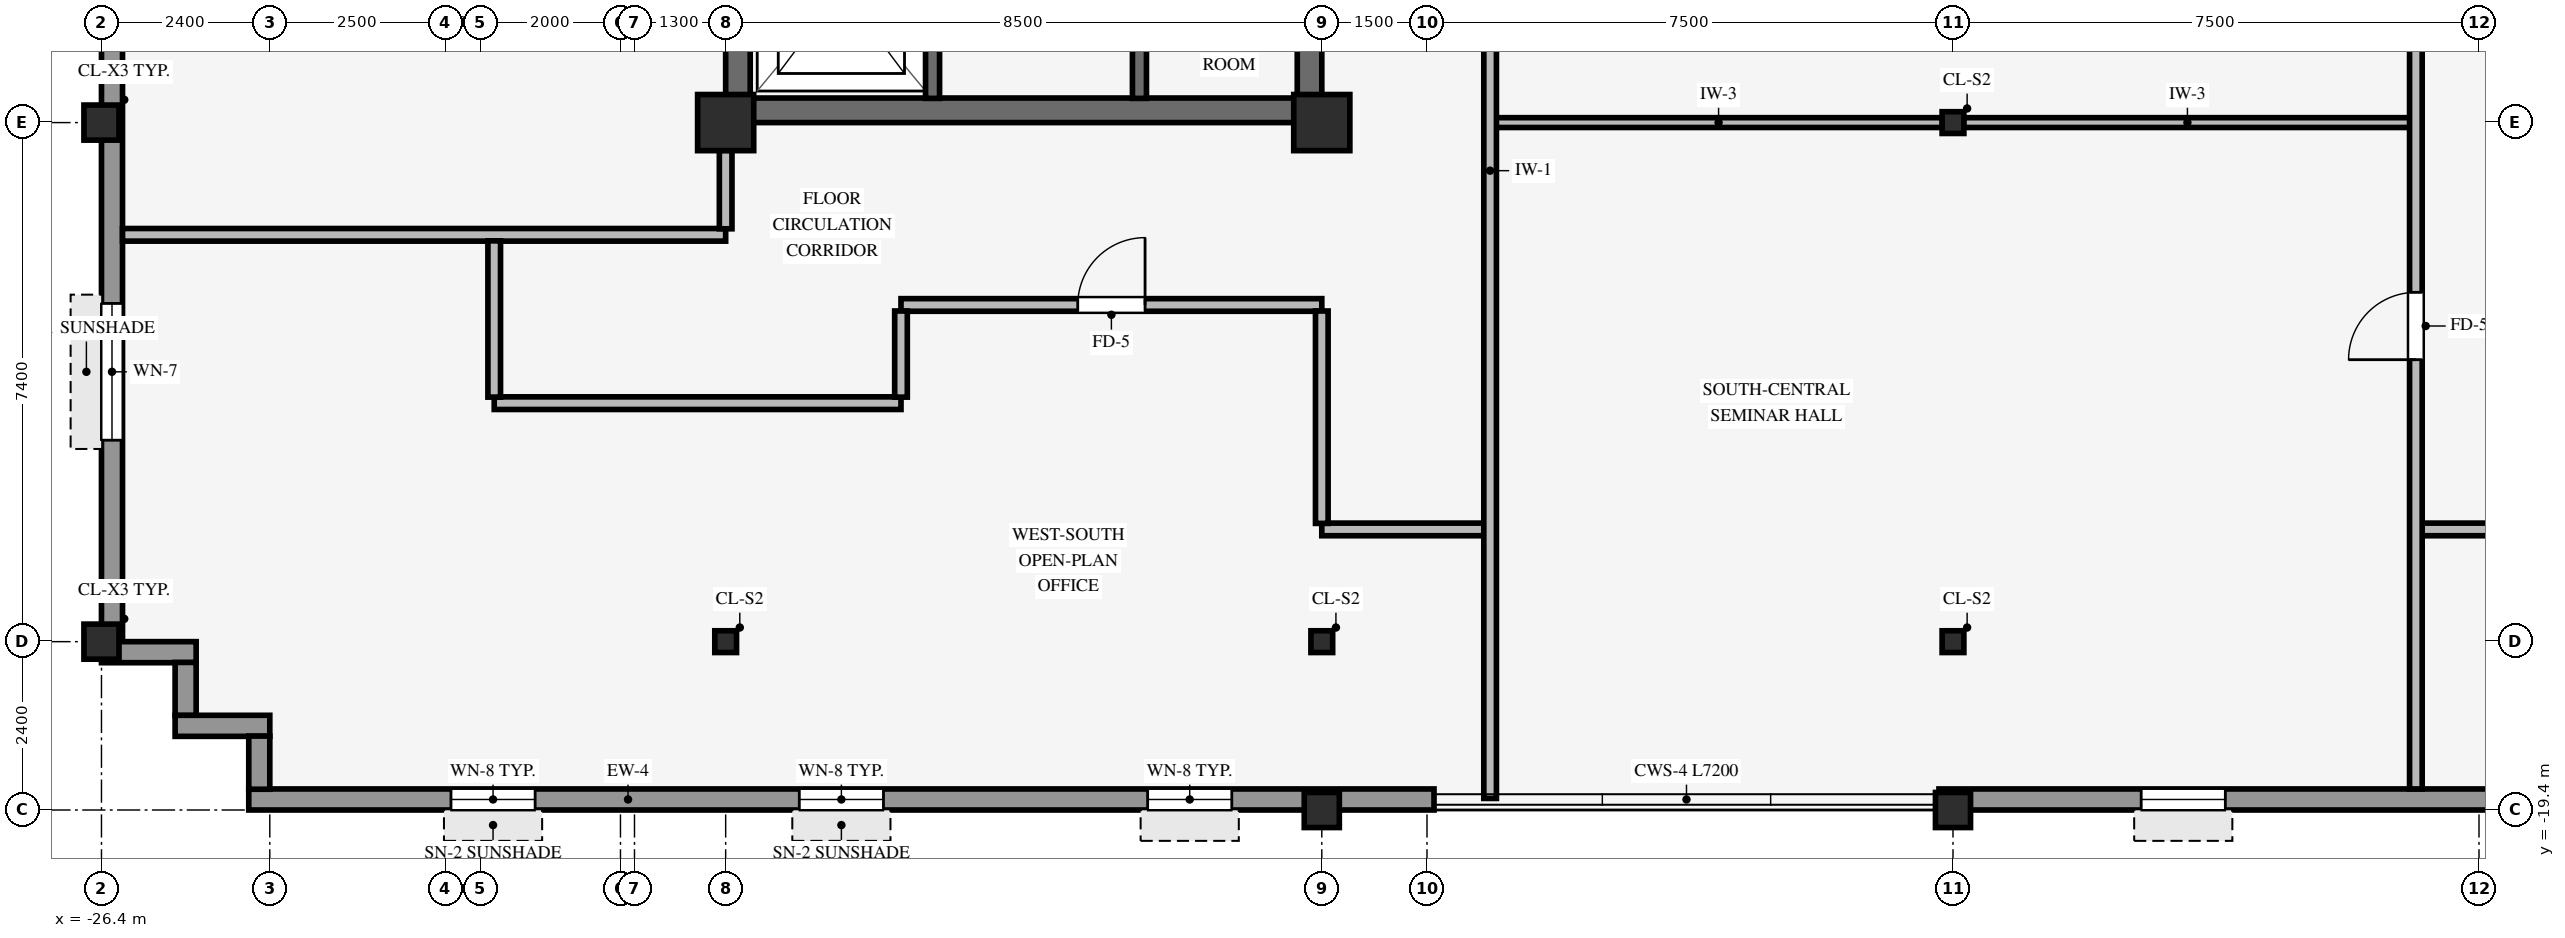
"""IFC4 building model, lengths in metres.
Left out: names, types, materials, properties, quantities, classifications, styles, units other than length and angle.
Written with IfcOpenShell. Run it as: python <this file> out.ifc"""

import sys

from ifc_helpers import new_model, si_unit, direction, frame, frame_2d, origin, origin_2d, place, context, subcontext, project, spatial, rectangle, hollow_rectangle, i_section, extrude, source, transform, mapped, element, fill, save


model = new_model("IFC4")
c1 = context("Model", 3, precision=1e-05, world=origin(), true_north=direction((0.0, 1.0)))
c2 = subcontext(c1, "Body", "Model", "MODEL_VIEW")
j1 = project(units=[si_unit("LENGTHUNIT", "METRE"), si_unit("PLANEANGLEUNIT", "RADIAN")], contexts=[c1])
p1 = place(None, origin())
s1 = spatial("IfcSite", under=j1, at=p1, CompositionType="ELEMENT")
p2 = place(p1, origin())
s2 = spatial("IfcBuilding", under=s1, at=p2, CompositionType="ELEMENT")
p3 = place(p2, frame((0.0, 0.0, 227.4)))
s3 = spatial("IfcBuildingStorey", under=s2, at=p3, CompositionType="ELEMENT", Elevation=227.4)
p4 = place(p3, frame((-17.5, -9.425, 0.0), z_axis=(0.0, 0.0, 1.0), x_axis=(1.0, 0.0, 0.0)))
e1 = element("IfcWall", 1, at=p4, inside=s3, PredefinedType="SHEAR", context=c2, shape_type="SweptSolid", body=[
    extrude(rectangle(XDim=8.5, YDim=0.35, at=frame_2d((4.25, 0.0))), origin(), (0.0, 0.0, 1.0), 3.37),
])
p5 = place(p3, frame((-17.325, -9.255, 0.0), z_axis=(0.0, 0.0, 1.0), x_axis=(0.0, 1.0, 0.0)))
e2 = element("IfcWall", 2, at=p5, inside=s3, PredefinedType="SHEAR", context=c2, shape_type="SweptSolid", body=[
    extrude(rectangle(XDim=18.51, YDim=0.35, at=frame_2d((9.255, 0.0))), origin(), (0.0, 0.0, 1.0), 3.37),
])
p6 = place(p3, frame((-9.175, -9.255, 0.0), z_axis=(0.0, 0.0, 1.0), x_axis=(0.0, 1.0, 0.0)))
e3 = element("IfcWall", 3, at=p6, inside=s3, PredefinedType="SHEAR", context=c2, shape_type="SweptSolid", body=[
    extrude(rectangle(XDim=18.51, YDim=0.35, at=frame_2d((9.255, 0.0))), origin(), (0.0, 0.0, 1.0), 3.37),
])
p7 = place(p6, frame((8.655, 0.0, 0.0)))
e4 = element("IfcOpeningElement", 4, at=p7, cuts=e3, PredefinedType="OPENING", context=c2, shape_type="SweptSolid", body=[
    extrude(rectangle(XDim=1.2, YDim=2.15, at=frame_2d((0.6, 1.075))), frame((0.0, 0.185, 0.0), z_axis=(0.0, -1.0, 0.0), x_axis=(1.0, 0.0, 0.0)), (0.0, 0.0, 1.0), 0.37),
])
for number, where, z_axis, x_axis in (
    (5, (-17.5, -9.6, 0.0), (0.0, 0.0, 1.0), (1.0, 0.0, 0.0)),
    (6, (-9.0, -9.6, 0.0), (0.0, 0.0, 1.0), (1.0, 0.0, 0.0)),
):
    element("IfcColumn", number, at=place(p3, frame(where, z_axis=z_axis, x_axis=x_axis)), inside=s3, PredefinedType="COLUMN", context=c2, shape_type="SweptSolid", body=[
        extrude(rectangle(XDim=0.8, YDim=0.8, at=origin_2d()), origin(), (0.0, 0.0, 1.0), 3.37),
    ])
for number, where, z_axis, x_axis in (
    (7, (-26.4, -17.0, 0.0), (0.0, 0.0, 1.0), (1.0, 0.0, 0.0)),
    (8, (-26.4, -9.6, 0.0), (0.0, 0.0, 1.0), (1.0, 0.0, 0.0)),
    (9, (-9.0, -19.4, 0.0), (0.0, 0.0, 1.0), (1.0, 0.0, 0.0)),
    (10, (0.0, -19.4, 0.0), (0.0, 0.0, 1.0), (1.0, 0.0, 0.0)),
):
    element("IfcColumn", number, at=place(p3, frame(where, z_axis=z_axis, x_axis=x_axis)), inside=s3, PredefinedType="COLUMN", context=c2, shape_type="SweptSolid", body=[
        extrude(hollow_rectangle(XDim=0.5, YDim=0.5, WallThickness=0.032, InnerFilletRadius=0.032, OuterFilletRadius=0.064, at=origin_2d()), origin(), (0.0, 0.0, 1.0), 3.37),
    ])
for number, where, z_axis, x_axis in (
    (11, (0.0, -17.0, 0.0), (0.0, 0.0, 1.0), (1.0, 0.0, 0.0)),
    (12, (0.0, -9.6, 0.0), (0.0, 0.0, 1.0), (1.0, 0.0, 0.0)),
    (13, (-17.5, -17.0, 0.0), (0.0, 0.0, 1.0), (1.0, 0.0, 0.0)),
    (14, (-9.0, -17.0, 0.0), (0.0, 0.0, 1.0), (1.0, 0.0, 0.0)),
):
    element("IfcColumn", number, at=place(p3, frame(where, z_axis=z_axis, x_axis=x_axis)), inside=s3, PredefinedType="COLUMN", context=c2, shape_type="SweptSolid", body=[
        extrude(i_section(OverallWidth=0.31, OverallDepth=0.31, WebThickness=0.015, FlangeThickness=0.015, FilletRadius=0.015, at=origin_2d()), origin(), (0.0, 0.0, 1.0), 3.37),
    ])
p8 = place(p3, frame((-24.3, -19.25, 0.0), z_axis=(0.0, 0.0, 1.0), x_axis=(1.0, 0.0, 0.0)))
e15 = element("IfcWall", 15, at=p8, inside=s3, PredefinedType="STANDARD", context=c2, shape_type="SweptSolid", body=[
    extrude(rectangle(XDim=16.9, YDim=0.3, at=frame_2d((8.45, 0.0))), origin(), (0.0, 0.0, 1.0), 2.705),
])
p9 = place(p8, frame((2.883, 0.0, 0.8)))
e16 = element("IfcOpeningElement", 16, at=p9, cuts=e15, PredefinedType="OPENING", context=c2, shape_type="SweptSolid", body=[
    extrude(rectangle(XDim=1.2, YDim=1.48, at=frame_2d((0.6, 0.74))), frame((0.0, 0.16, 0.0), z_axis=(0.0, -1.0, 0.0), x_axis=(1.0, 0.0, 0.0)), (0.0, 0.0, 1.0), 0.32),
])
p10 = place(p8, frame((7.85, 0.0, 0.8)))
e17 = element("IfcOpeningElement", 17, at=p10, cuts=e15, PredefinedType="OPENING", context=c2, shape_type="SweptSolid", body=[
    extrude(rectangle(XDim=1.2, YDim=1.48, at=frame_2d((0.6, 0.74))), frame((0.0, 0.16, 0.0), z_axis=(0.0, -1.0, 0.0), x_axis=(1.0, 0.0, 0.0)), (0.0, 0.0, 1.0), 0.32),
])
p11 = place(p8, frame((12.817, 0.0, 0.8)))
e18 = element("IfcOpeningElement", 18, at=p11, cuts=e15, PredefinedType="OPENING", context=c2, shape_type="SweptSolid", body=[
    extrude(rectangle(XDim=1.2, YDim=1.48, at=frame_2d((0.6, 0.74))), frame((0.0, 0.16, 0.0), z_axis=(0.0, -1.0, 0.0), x_axis=(1.0, 0.0, 0.0)), (0.0, 0.0, 1.0), 0.32),
])
p12 = place(p3, frame((-0.2, -19.25, 0.0), z_axis=(0.0, 0.0, 1.0), x_axis=(1.0, 0.0, 0.0)))
e19 = element("IfcWall", 19, at=p12, inside=s3, PredefinedType="STANDARD", context=c2, shape_type="SweptSolid", body=[
    extrude(rectangle(XDim=16.9, YDim=0.3, at=frame_2d((8.45, 0.0))), origin(), (0.0, 0.0, 1.0), 2.705),
])
p13 = place(p12, frame((2.883, 0.0, 0.8)))
e20 = element("IfcOpeningElement", 20, at=p13, cuts=e19, PredefinedType="OPENING", context=c2, shape_type="SweptSolid", body=[
    extrude(rectangle(XDim=1.2, YDim=1.48, at=frame_2d((0.6, 0.74))), frame((0.0, 0.16, 0.0), z_axis=(0.0, -1.0, 0.0), x_axis=(1.0, 0.0, 0.0)), (0.0, 0.0, 1.0), 0.32),
])
p14 = place(p12, frame((12.817, 0.0, 0.8)))
e21 = element("IfcOpeningElement", 21, at=p14, cuts=e19, PredefinedType="OPENING", context=c2, shape_type="SweptSolid", body=[
    extrude(rectangle(XDim=1.2, YDim=1.48, at=frame_2d((0.6, 0.74))), frame((0.0, 0.16, 0.0), z_axis=(0.0, -1.0, 0.0), x_axis=(1.0, 0.0, 0.0)), (0.0, 0.0, 1.0), 0.32),
])
p15 = place(p3, frame((-26.25, -17.004, 0.0), z_axis=(0.0, 0.0, 1.0), x_axis=(0.0, 1.0, 0.0)))
e22 = element("IfcWall", 22, at=p15, inside=s3, PredefinedType="STANDARD", context=c2, shape_type="SweptSolid", body=[
    extrude(rectangle(XDim=13.404, YDim=0.3, at=frame_2d((6.702, 0.0))), origin(), (0.0, 0.0, 1.0), 2.705),
])
p16 = place(p15, frame((2.876, 0.0, 0.8)))
e23 = element("IfcOpeningElement", 23, at=p16, cuts=e22, PredefinedType="OPENING", context=c2, shape_type="SweptSolid", body=[
    extrude(rectangle(XDim=1.95, YDim=1.48, at=frame_2d((0.975, 0.74))), frame((0.0, 0.16, 0.0), z_axis=(0.0, -1.0, 0.0), x_axis=(1.0, 0.0, 0.0)), (0.0, 0.0, 1.0), 0.32),
])
p17 = place(p15, frame((8.578, 0.0, 0.8)))
e24 = element("IfcOpeningElement", 24, at=p17, cuts=e22, PredefinedType="OPENING", context=c2, shape_type="SweptSolid", body=[
    extrude(rectangle(XDim=1.95, YDim=1.48, at=frame_2d((0.975, 0.74))), frame((0.0, 0.16, 0.0), z_axis=(0.0, -1.0, 0.0), x_axis=(1.0, 0.0, 0.0)), (0.0, 0.0, 1.0), 0.32),
])
p18 = place(p3, frame((-26.4, -17.15, 0.0), z_axis=(0.0, 0.0, 1.0), x_axis=(1.0, 0.0, 0.0)))
e25 = element("IfcWall", 25, at=p18, inside=s3, PredefinedType="STANDARD", context=c2, shape_type="SweptSolid", body=[
    extrude(rectangle(XDim=1.35, YDim=0.3, at=frame_2d((0.675, 0.0))), origin(), (0.0, 0.0, 1.0), 2.892),
])
p19 = place(p3, frame((-25.2, -18.054, 0.0), z_axis=(0.0, 0.0, 1.0), x_axis=(0.0, 1.0, 0.0)))
e26 = element("IfcWall", 26, at=p19, inside=s3, PredefinedType="STANDARD", context=c2, shape_type="SweptSolid", body=[
    extrude(rectangle(XDim=0.758, YDim=0.3, at=frame_2d((0.379, 0.0))), origin(), (0.0, 0.0, 1.0), 2.892),
])
p20 = place(p3, frame((-25.35, -18.2, 0.0), z_axis=(0.0, 0.0, 1.0), x_axis=(1.0, 0.0, 0.0)))
e27 = element("IfcWall", 27, at=p20, inside=s3, PredefinedType="STANDARD", context=c2, shape_type="SweptSolid", body=[
    extrude(rectangle(XDim=1.35, YDim=0.3, at=frame_2d((0.675, 0.0))), origin(), (0.0, 0.0, 1.0), 2.892),
])
p21 = place(p3, frame((-24.15, -19.104, 0.0), z_axis=(0.0, 0.0, 1.0), x_axis=(0.0, 1.0, 0.0)))
e28 = element("IfcWall", 28, at=p21, inside=s3, PredefinedType="STANDARD", context=c2, shape_type="SweptSolid", body=[
    extrude(rectangle(XDim=0.758, YDim=0.3, at=frame_2d((0.379, 0.0))), origin(), (0.0, 0.0, 1.0), 2.892),
])
p22 = place(p3, frame((-14.55, -9.255, 0.0), z_axis=(0.0, 0.0, 1.0), x_axis=(0.0, 1.0, 0.0)))
e29 = element("IfcWall", 29, at=p22, inside=s3, PredefinedType="SHEAR", context=c2, shape_type="SweptSolid", body=[
    extrude(rectangle(XDim=3.06, YDim=0.2, at=frame_2d((1.53, 0.0))), origin(), (0.0, 0.0, 1.0), 3.37),
])
p23 = place(p22, frame((0.98, 0.0, 0.0)))
e30 = element("IfcOpeningElement", 30, at=p23, cuts=e29, PredefinedType="OPENING", context=c2, shape_type="SweptSolid", body=[
    extrude(rectangle(XDim=1.15, YDim=2.15, at=frame_2d((0.575, 1.075))), frame((0.0, 0.11, 0.0), z_axis=(0.0, -1.0, 0.0), x_axis=(1.0, 0.0, 0.0)), (0.0, 0.0, 1.0), 0.22),
])
p24 = place(p3, frame((-11.6, -9.255, 0.0), z_axis=(0.0, 0.0, 1.0), x_axis=(0.0, 1.0, 0.0)))
e31 = element("IfcWall", 31, at=p24, inside=s3, PredefinedType="SHEAR", context=c2, shape_type="SweptSolid", body=[
    extrude(rectangle(XDim=8.025, YDim=0.2, at=frame_2d((4.012, 0.0))), origin(), (0.0, 0.0, 1.0), 3.37),
])
p25 = place(p24, frame((1.615, 0.0, 0.0)))
e32 = element("IfcOpeningElement", 32, at=p25, cuts=e31, PredefinedType="OPENING", context=c2, shape_type="SweptSolid", body=[
    extrude(rectangle(XDim=0.88, YDim=2.1, at=frame_2d((0.44, 1.05))), frame((0.0, 0.11, 0.0), z_axis=(0.0, -1.0, 0.0), x_axis=(1.0, 0.0, 0.0)), (0.0, 0.0, 1.0), 0.22),
])
p26 = place(p24, frame((5.615, 0.0, 0.0)))
e33 = element("IfcOpeningElement", 33, at=p26, cuts=e31, PredefinedType="OPENING", context=c2, shape_type="SweptSolid", body=[
    extrude(rectangle(XDim=0.88, YDim=2.1, at=frame_2d((0.44, 1.05))), frame((0.0, 0.11, 0.0), z_axis=(0.0, -1.0, 0.0), x_axis=(1.0, 0.0, 0.0)), (0.0, 0.0, 1.0), 0.22),
])
for number, where, z_axis, x_axis in (
    (34, (-9.0, -15.4, 0.0), (0.0, 0.0, 1.0), (1.0, 0.0, 0.0)),
    (35, (6.666, -15.4, 0.0), (0.0, 0.0, 1.0), (1.0, 0.0, 0.0)),
):
    element("IfcWall", number, at=place(p3, frame(where, z_axis=z_axis, x_axis=x_axis)), inside=s3, PredefinedType="PARTITIONING", context=c2, shape_type="SweptSolid", body=[
        extrude(rectangle(XDim=2.334, YDim=0.18, at=frame_2d((1.167, 0.0))), origin(), (0.0, 0.0, 1.0), 3.36),
    ])
p27 = place(p3, frame((-20.8, -13.6, 0.0), z_axis=(0.0, 0.0, 1.0), x_axis=(1.0, 0.0, 0.0)))
e36 = element("IfcWall", 36, at=p27, inside=s3, PredefinedType="PARTITIONING", context=c2, shape_type="SweptSolid", body=[
    extrude(rectangle(XDim=5.8, YDim=0.18, at=frame_2d((2.9, 0.0))), origin(), (0.0, 0.0, 1.0), 3.049),
])
p28 = place(p3, frame((-15.0, -12.2, 0.0), z_axis=(0.0, 0.0, 1.0), x_axis=(1.0, 0.0, 0.0)))
e37 = element("IfcWall", 37, at=p28, inside=s3, PredefinedType="PARTITIONING", context=c2, shape_type="SweptSolid", body=[
    extrude(rectangle(XDim=6.0, YDim=0.18, at=frame_2d((3.0, 0.0))), origin(), (0.0, 0.0, 1.0), 3.36),
])
p29 = place(p28, frame((2.52, 0.0, 0.0)))
e38 = element("IfcOpeningElement", 38, at=p29, cuts=e37, PredefinedType="OPENING", context=c2, shape_type="SweptSolid", body=[
    extrude(rectangle(XDim=0.96, YDim=2.1, at=frame_2d((0.48, 1.05))), frame((0.0, 0.1, 0.0), z_axis=(0.0, -1.0, 0.0), x_axis=(1.0, 0.0, 0.0)), (0.0, 0.0, 1.0), 0.2),
])
p30 = place(p3, frame((-26.1, -11.2, 0.0), z_axis=(0.0, 0.0, 1.0), x_axis=(1.0, 0.0, 0.0)))
e39 = element("IfcWall", 39, at=p30, inside=s3, PredefinedType="PARTITIONING", context=c2, shape_type="SweptSolid", body=[
    extrude(rectangle(XDim=8.6, YDim=0.18, at=frame_2d((4.3, 0.0))), origin(), (0.0, 0.0, 1.0), 3.36),
])
for number, where, z_axis, x_axis in (
    (40, (-6.534, -9.6, 0.0), (0.0, 0.0, 1.0), (1.0, 0.0, 0.0)),
    (41, (0.151, -9.6, 0.0), (0.0, 0.0, 1.0), (1.0, 0.0, 0.0)),
):
    element("IfcWall", number, at=place(p3, frame(where, z_axis=z_axis, x_axis=x_axis)), inside=s3, PredefinedType="PARTITIONING", context=c2, shape_type="SweptSolid", body=[
        extrude(rectangle(XDim=6.383, YDim=0.14, at=frame_2d((3.191, 0.0))), origin(), (0.0, 0.0, 1.0), 2.405),
    ])
p31 = place(p3, frame((-20.8, -13.514, 0.0), z_axis=(0.0, 0.0, 1.0), x_axis=(0.0, 1.0, 0.0)))
e42 = element("IfcWall", 42, at=p31, inside=s3, PredefinedType="PARTITIONING", context=c2, shape_type="SweptSolid", body=[
    extrude(rectangle(XDim=2.228, YDim=0.18, at=frame_2d((1.114, 0.0))), origin(), (0.0, 0.0, 1.0), 3.36),
])
p32 = place(p3, frame((-17.5, -11.114, 0.0), z_axis=(0.0, 0.0, 1.0), x_axis=(0.0, 1.0, 0.0)))
e43 = element("IfcWall", 43, at=p32, inside=s3, PredefinedType="PARTITIONING", context=c2, shape_type="SweptSolid", body=[
    extrude(rectangle(XDim=1.118, YDim=0.18, at=frame_2d((0.559, 0.0))), origin(), (0.0, 0.0, 1.0), 2.892),
])
p33 = place(p3, frame((-15.0, -13.514, 0.0), z_axis=(0.0, 0.0, 1.0), x_axis=(0.0, 1.0, 0.0)))
e44 = element("IfcWall", 44, at=p33, inside=s3, PredefinedType="PARTITIONING", context=c2, shape_type="SweptSolid", body=[
    extrude(rectangle(XDim=1.228, YDim=0.18, at=frame_2d((0.614, 0.0))), origin(), (0.0, 0.0, 1.0), 3.36),
])
p34 = place(p3, frame((-9.0, -15.314, 0.0), z_axis=(0.0, 0.0, 1.0), x_axis=(0.0, 1.0, 0.0)))
e45 = element("IfcWall", 45, at=p34, inside=s3, PredefinedType="PARTITIONING", context=c2, shape_type="SweptSolid", body=[
    extrude(rectangle(XDim=3.028, YDim=0.18, at=frame_2d((1.514, 0.0))), origin(), (0.0, 0.0, 1.0), 2.892),
])
p35 = place(p3, frame((-6.6, -19.235, 0.0), z_axis=(0.0, 0.0, 1.0), x_axis=(0.0, 1.0, 0.0)))
e46 = element("IfcWall", 46, at=p35, inside=s3, PredefinedType="PARTITIONING", context=c2, shape_type="SweptSolid", body=[
    extrude(rectangle(XDim=17.899, YDim=0.18, at=frame_2d((8.95, 0.0))), origin(), (0.0, 0.0, 1.0), 3.36),
])
p36 = place(p3, frame((6.6, -19.1, 0.0), z_axis=(0.0, 0.0, 1.0), x_axis=(0.0, 1.0, 0.0)))
e47 = element("IfcWall", 47, at=p36, inside=s3, PredefinedType="PARTITIONING", context=c2, shape_type="SweptSolid", body=[
    extrude(rectangle(XDim=17.764, YDim=0.18, at=frame_2d((8.882, 0.0))), origin(), (0.0, 0.0, 1.0), 3.36),
])
p37 = place(p36, frame((6.12, 0.0, 0.0)))
e48 = element("IfcOpeningElement", 48, at=p37, cuts=e47, PredefinedType="OPENING", context=c2, shape_type="SweptSolid", body=[
    extrude(rectangle(XDim=0.96, YDim=2.1, at=frame_2d((0.48, 1.05))), frame((0.0, 0.1, 0.0), z_axis=(0.0, -1.0, 0.0), x_axis=(1.0, 0.0, 0.0)), (0.0, 0.0, 1.0), 0.2),
])
m1 = source(origin(), c2, "Body", "SweptSolid", [
    extrude(rectangle(XDim=1.2, YDim=1.48, at=frame_2d((0.6, 0.74))), frame((0.0, 0.03, 0.0), z_axis=(0.0, -1.0, 0.0), x_axis=(1.0, 0.0, 0.0)), (0.0, 0.0, 1.0), 0.06),
])
p38 = place(p9, origin())
e49 = element("IfcWindow", 49, at=p38, inside=s3, PartitioningType="SINGLE_PANEL", PredefinedType="WINDOW", context=c2, shape_type="MappedRepresentation", body=[
    mapped(m1, transform((0.0, 0.0, 0.0), scale=1.0)),
])
fill(e16, e49)
p39 = place(p10, origin())
e50 = element("IfcWindow", 50, at=p39, inside=s3, PartitioningType="SINGLE_PANEL", PredefinedType="WINDOW", context=c2, shape_type="MappedRepresentation", body=[
    mapped(m1, transform((0.0, 0.0, 0.0), scale=1.0)),
])
fill(e17, e50)
p40 = place(p11, origin())
e51 = element("IfcWindow", 51, at=p40, inside=s3, PartitioningType="SINGLE_PANEL", PredefinedType="WINDOW", context=c2, shape_type="MappedRepresentation", body=[
    mapped(m1, transform((0.0, 0.0, 0.0), scale=1.0)),
])
fill(e18, e51)
p41 = place(p13, origin())
e52 = element("IfcWindow", 52, at=p41, inside=s3, PartitioningType="SINGLE_PANEL", PredefinedType="WINDOW", context=c2, shape_type="MappedRepresentation", body=[
    mapped(m1, transform((0.0, 0.0, 0.0), scale=1.0)),
])
fill(e20, e52)
m2 = source(origin(), c2, "Body", "SweptSolid", [
    extrude(rectangle(XDim=1.95, YDim=1.48, at=frame_2d((0.975, 0.74))), frame((0.0, 0.03, 0.0), z_axis=(0.0, -1.0, 0.0), x_axis=(1.0, 0.0, 0.0)), (0.0, 0.0, 1.0), 0.06),
])
p42 = place(p16, origin())
e53 = element("IfcWindow", 53, at=p42, inside=s3, PartitioningType="SINGLE_PANEL", PredefinedType="WINDOW", context=c2, shape_type="MappedRepresentation", body=[
    mapped(m2, transform((0.0, 0.0, 0.0), scale=1.0)),
])
fill(e23, e53)
m3 = source(origin(), c2, "Body", "SweptSolid", [
    extrude(rectangle(XDim=0.96, YDim=2.1, at=frame_2d((0.48, 1.05))), frame((0.0, 0.025, 0.0), z_axis=(0.0, -1.0, 0.0), x_axis=(1.0, 0.0, 0.0)), (0.0, 0.0, 1.0), 0.05),
])
p43 = place(p29, origin())
e54 = element("IfcDoor", 54, at=p43, inside=s3, OperationType="SINGLE_SWING_RIGHT", PredefinedType="DOOR", context=c2, shape_type="MappedRepresentation", body=[
    mapped(m3, transform((0.0, 0.0, 0.0), scale=1.0)),
])
fill(e38, e54)
p44 = place(p37, origin())
e55 = element("IfcDoor", 55, at=p44, inside=s3, OperationType="SINGLE_SWING_LEFT", PredefinedType="DOOR", context=c2, shape_type="MappedRepresentation", body=[
    mapped(m3, transform((0.0, 0.0, 0.0), scale=1.0)),
])
fill(e48, e55)
save(model, sys.argv[1])
